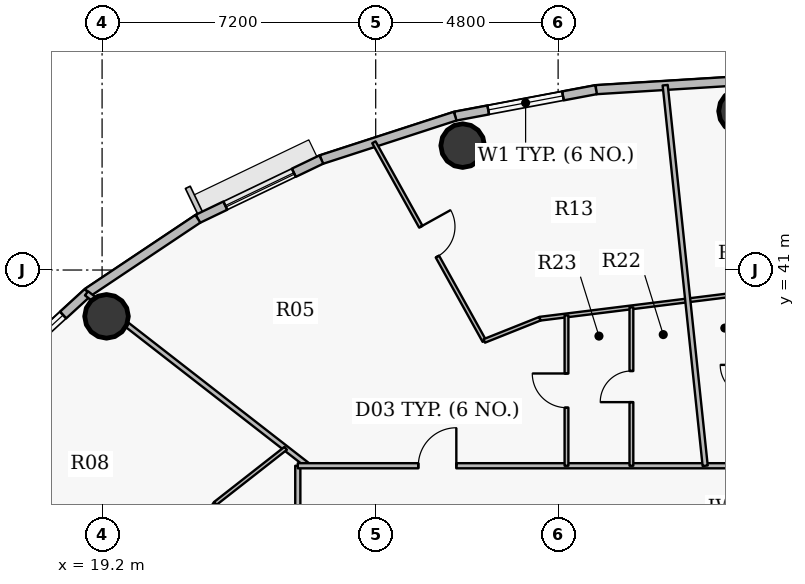
"""IFC4 building model, lengths in metres.
Left out: names, types, materials, properties, quantities, classifications, styles, units other than length and angle.
Written with IfcOpenShell. Run it as: python <this file> out.ifc"""

import sys

from ifc_helpers import new_model, si_unit, direction, frame, frame_2d, origin, origin_2d, place, context, subcontext, project, spatial, rectangle, hollow_circle, extrude, source, transform, mapped, element, fill, save


model = new_model("IFC4")
c1 = context("Model", 3, precision=1e-05, world=origin(), true_north=direction((0.0, 1.0)))
c2 = subcontext(c1, "Body", "Model", "MODEL_VIEW")
j1 = project(units=[si_unit("LENGTHUNIT", "METRE"), si_unit("PLANEANGLEUNIT", "RADIAN")], contexts=[c1])
p1 = place(None, origin())
s1 = spatial("IfcSite", under=j1, at=p1, CompositionType="ELEMENT")
p2 = place(p1, origin())
s2 = spatial("IfcBuilding", under=s1, at=p2, CompositionType="ELEMENT")
p3 = place(p2, frame((0.0, 0.0, 236.55)))
s3 = spatial("IfcBuildingStorey", under=s2, at=p3, CompositionType="ELEMENT", Elevation=236.55)
for number, where, z_axis, x_axis in (
    (1, (36.0, 45.18, 0.0), (0.0, 0.0, 1.0), (1.0, 0.0, 0.0)),
    (2, (28.688, 44.273, 0.0), (0.0, 0.0, 1.0), (1.0, 0.0, 0.0)),
    (3, (19.317, 39.781, 0.0), (0.0, 0.0, 1.0), (1.0, 0.0, 0.0)),
):
    element("IfcColumn", number, at=place(p3, frame(where, z_axis=z_axis, x_axis=x_axis)), inside=s3, PredefinedType="COLUMN", context=c2, shape_type="SweptSolid", body=[
        extrude(hollow_circle(Radius=0.575, WallThickness=0.036, at=origin_2d()), origin(), (0.0, 0.0, 1.0), 3.75),
    ])
p4 = place(p3, frame((32.198, 45.746, 0.0), z_axis=(0.0, 0.0, 1.0), x_axis=(0.998108785312, 0.06147237333, 0.0)))
e4 = element("IfcWall", 4, at=p4, inside=s3, PredefinedType="SOLIDWALL", context=c2, shape_type="SweptSolid", body=[
    extrude(rectangle(XDim=3.809, YDim=0.24, at=frame_2d((1.904, 0.0))), origin(), (0.0, 0.0, 1.0), 3.5),
])
p5 = place(p3, frame((28.491, 45.049, 0.0), z_axis=(0.0, 0.0, 1.0), x_axis=(0.982784898575, 0.184753465822, 0.0)))
e5 = element("IfcWall", 5, at=p5, inside=s3, PredefinedType="SOLIDWALL", context=c2, shape_type="SweptSolid", body=[
    extrude(rectangle(XDim=3.773, YDim=0.24, at=frame_2d((1.886, 0.0))), origin(), (0.0, 0.0, 1.0), 3.5),
])
p6 = place(p5, frame((0.886, 0.0, 0.9)))
e6 = element("IfcOpeningElement", 6, at=p6, cuts=e5, PredefinedType="OPENING", context=c2, shape_type="SweptSolid", body=[
    extrude(rectangle(XDim=2.0, YDim=1.75, at=origin_2d()), frame((1.0, 0.13, 0.875), z_axis=(0.0, -1.0, 0.0), x_axis=(1.0, 0.0, 0.0)), (0.0, 0.0, 1.0), 0.26),
])
p7 = place(p3, frame((24.969, 43.906, 0.0), z_axis=(0.0, 0.0, 1.0), x_axis=(0.951210789182, 0.308541787354, 0.0)))
e7 = element("IfcWall", 7, at=p7, inside=s3, PredefinedType="SOLIDWALL", context=c2, shape_type="SweptSolid", body=[
    extrude(rectangle(XDim=3.702, YDim=0.24, at=frame_2d((1.851, 0.0))), origin(), (0.0, 0.0, 1.0), 3.5),
])
p8 = place(p3, frame((21.72, 42.348, 0.0), z_axis=(0.0, 0.0, 1.0), x_axis=(0.901598104751, 0.432574684313, 0.0)))
e8 = element("IfcWall", 8, at=p8, inside=s3, PredefinedType="SOLIDWALL", context=c2, shape_type="SweptSolid", body=[
    extrude(rectangle(XDim=3.604, YDim=0.24, at=frame_2d((1.802, 0.0))), origin(), (0.0, 0.0, 1.0), 3.5),
])
p9 = place(p8, frame((0.802, 0.0, 0.9)))
e9 = element("IfcOpeningElement", 9, at=p9, cuts=e8, PredefinedType="OPENING", context=c2, shape_type="SweptSolid", body=[
    extrude(rectangle(XDim=2.0, YDim=1.75, at=origin_2d()), frame((1.0, 0.13, 0.875), z_axis=(0.0, -1.0, 0.0), x_axis=(1.0, 0.0, 0.0)), (0.0, 0.0, 1.0), 0.26),
])
p10 = place(p3, frame((18.824, 40.411, 0.0), z_axis=(0.0, 0.0, 1.0), x_axis=(0.831262496074, 0.555880079352, 0.0)))
e10 = element("IfcWall", 10, at=p10, inside=s3, PredefinedType="SOLIDWALL", context=c2, shape_type="SweptSolid", body=[
    extrude(rectangle(XDim=3.484, YDim=0.24, at=frame_2d((1.742, 0.0))), origin(), (0.0, 0.0, 1.0), 3.5),
])
p11 = place(p3, frame((16.352, 38.145, 0.0), z_axis=(0.0, 0.0, 1.0), x_axis=(0.737123922599, 0.675757591694, 0.0)))
e11 = element("IfcWall", 11, at=p11, inside=s3, PredefinedType="SOLIDWALL", context=c2, shape_type="SweptSolid", body=[
    extrude(rectangle(XDim=3.354, YDim=0.24, at=frame_2d((1.677, 0.0))), origin(), (0.0, 0.0, 1.0), 3.5),
])
p12 = place(p11, frame((0.873, 0.0, 0.9)))
e12 = element("IfcOpeningElement", 12, at=p12, cuts=e11, PredefinedType="OPENING", context=c2, shape_type="SweptSolid", body=[
    extrude(rectangle(XDim=1.6, YDim=1.75, at=origin_2d()), frame((0.8, 0.13, 0.875), z_axis=(0.0, -1.0, 0.0), x_axis=(1.0, 0.0, 0.0)), (0.0, 0.0, 1.0), 0.26),
])
p13 = place(p3, frame((18.791, 40.387, 0.0), z_axis=(0.0, 0.0, 1.0), x_axis=(0.789302404173, -0.614004653701, 0.0)))
e13 = element("IfcWall", 13, at=p13, inside=s3, PredefinedType="PARTITIONING", context=c2, shape_type="SweptSolid", body=[
    extrude(rectangle(XDim=7.39, YDim=0.135, at=frame_2d((3.695, 0.0))), origin(), (0.0, 0.0, 1.0), 2.935),
])
p14 = place(p3, frame((19.847, 31.273, 0.0), z_axis=(0.0, 0.0, 1.0), x_axis=(0.545399280946, 0.83817636828, 0.0)))
e14 = element("IfcWall", 14, at=p14, inside=s3, PredefinedType="PARTITIONING", context=c2, shape_type="SweptSolid", body=[
    extrude(rectangle(XDim=4.28, YDim=0.1, at=frame_2d((2.14, 0.0))), origin(), (0.0, 0.0, 1.0), 2.935),
])
p15 = place(p3, frame((22.182, 34.861, 0.0), z_axis=(0.0, 0.0, 1.0), x_axis=(0.78737344739, 0.616476320994, 0.0)))
e15 = element("IfcWall", 15, at=p15, inside=s3, PredefinedType="PARTITIONING", context=c2, shape_type="SweptSolid", body=[
    extrude(rectangle(XDim=2.35, YDim=0.1, at=frame_2d((1.175, 0.0))), origin(), (0.0, 0.0, 1.0), 2.935),
])
p16 = place(p3, frame((24.35, 27.95, 0.0), z_axis=(0.0, 0.0, 1.0), x_axis=(0.0, 1.0, 0.0)))
e16 = element("IfcWall", 16, at=p16, inside=s3, PredefinedType="PARTITIONING", context=c2, shape_type="SweptSolid", body=[
    extrude(rectangle(XDim=7.9, YDim=0.135, at=frame_2d((3.95, 0.0))), origin(), (0.0, 0.0, 1.0), 2.935),
])
p17 = place(p16, frame((3.45, 0.0, 0.0)))
e17 = element("IfcOpeningElement", 17, at=p17, cuts=e16, PredefinedType="OPENING", context=c2, shape_type="SweptSolid", body=[
    extrude(rectangle(XDim=1.0, YDim=2.15, at=origin_2d()), frame((0.5, 0.078, 1.075), z_axis=(0.0, -1.0, 0.0), x_axis=(1.0, 0.0, 0.0)), (0.0, 0.0, 1.0), 0.155),
])
p18 = place(p3, frame((24.35, 35.85, 0.0), z_axis=(0.0, 0.0, 1.0), x_axis=(1.0, 0.0, 0.0)))
e18 = element("IfcWall", 18, at=p18, inside=s3, PredefinedType="PARTITIONING", context=c2, shape_type="SweptSolid", body=[
    extrude(rectangle(XDim=26.218, YDim=0.135, at=frame_2d((13.109, 0.0))), origin(), (0.0, 0.0, 1.0), 2.935),
])
p19 = place(p18, frame((3.172, 0.0, 0.0)))
e19 = element("IfcOpeningElement", 19, at=p19, cuts=e18, PredefinedType="OPENING", context=c2, shape_type="SweptSolid", body=[
    extrude(rectangle(XDim=1.0, YDim=2.15, at=origin_2d()), frame((0.5, 0.078, 1.075), z_axis=(0.0, -1.0, 0.0), x_axis=(1.0, 0.0, 0.0)), (0.0, 0.0, 1.0), 0.155),
])
p20 = place(p18, frame((18.306, 0.0, 0.0)))
e20 = element("IfcOpeningElement", 20, at=p20, cuts=e18, PredefinedType="OPENING", context=c2, shape_type="SweptSolid", body=[
    extrude(rectangle(XDim=1.0, YDim=2.15, at=origin_2d()), frame((0.5, 0.078, 1.075), z_axis=(0.0, -1.0, 0.0), x_axis=(1.0, 0.0, 0.0)), (0.0, 0.0, 1.0), 0.155),
])
p21 = place(p3, frame((26.353, 44.361, 0.0), z_axis=(0.0, 0.0, 1.0), x_axis=(0.485760805935, -0.874091779745, 0.0)))
e21 = element("IfcWall", 21, at=p21, inside=s3, PredefinedType="PARTITIONING", context=c2, shape_type="SweptSolid", body=[
    extrude(rectangle(XDim=5.979, YDim=0.1, at=frame_2d((2.989, 0.0))), origin(), (0.0, 0.0, 1.0), 2.985),
])
p22 = place(p21, frame((2.539, 0.0, 0.0)))
e22 = element("IfcOpeningElement", 22, at=p22, cuts=e21, PredefinedType="OPENING", context=c2, shape_type="SweptSolid", body=[
    extrude(rectangle(XDim=0.9, YDim=2.1, at=origin_2d()), frame((0.45, 0.06, 1.05), z_axis=(0.0, -1.0, 0.0), x_axis=(1.0, 0.0, 0.0)), (0.0, 0.0, 1.0), 0.12),
])
p23 = place(p3, frame((29.257, 39.135, 0.0), z_axis=(0.0, 0.0, 1.0), x_axis=(0.928796620339, 0.370589851515, 0.0)))
e23 = element("IfcWall", 23, at=p23, inside=s3, PredefinedType="PARTITIONING", context=c2, shape_type="SweptSolid", body=[
    extrude(rectangle(XDim=1.577, YDim=0.1, at=frame_2d((0.789, 0.0))), origin(), (0.0, 0.0, 1.0), 2.935),
])
p24 = place(p3, frame((30.722, 39.719, 0.0), z_axis=(0.0, 0.0, 1.0), x_axis=(0.992397473883, 0.123074180196, 0.0)))
e24 = element("IfcWall", 24, at=p24, inside=s3, PredefinedType="PARTITIONING", context=c2, shape_type="SweptSolid", body=[
    extrude(rectangle(XDim=5.318, YDim=0.1, at=frame_2d((2.659, 0.0))), origin(), (0.0, 0.0, 1.0), 2.935),
])
p25 = place(p3, frame((31.42, 35.85, 0.0), z_axis=(0.0, 0.0, 1.0), x_axis=(0.0, 1.0, 0.0)))
e25 = element("IfcWall", 25, at=p25, inside=s3, PredefinedType="PARTITIONING", context=c2, shape_type="SweptSolid", body=[
    extrude(rectangle(XDim=3.956, YDim=0.1, at=frame_2d((1.978, 0.0))), origin(), (0.0, 0.0, 1.0), 2.935),
])
p26 = place(p25, frame((1.528, 0.0, 0.0)))
e26 = element("IfcOpeningElement", 26, at=p26, cuts=e25, PredefinedType="OPENING", context=c2, shape_type="SweptSolid", body=[
    extrude(rectangle(XDim=0.9, YDim=2.1, at=origin_2d()), frame((0.45, 0.06, 1.05), z_axis=(0.0, -1.0, 0.0), x_axis=(1.0, 0.0, 0.0)), (0.0, 0.0, 1.0), 0.12),
])
p27 = place(p3, frame((33.129, 35.85, 0.0), z_axis=(0.0, 0.0, 1.0), x_axis=(0.0, 1.0, 0.0)))
e27 = element("IfcWall", 27, at=p27, inside=s3, PredefinedType="PARTITIONING", context=c2, shape_type="SweptSolid", body=[
    extrude(rectangle(XDim=4.167, YDim=0.1, at=frame_2d((2.083, 0.0))), origin(), (0.0, 0.0, 1.0), 3.035),
])
p28 = place(p27, frame((1.674, 0.0, 0.0)))
e28 = element("IfcOpeningElement", 28, at=p28, cuts=e27, PredefinedType="OPENING", context=c2, shape_type="SweptSolid", body=[
    extrude(rectangle(XDim=0.82, YDim=2.1, at=origin_2d()), frame((0.41, 0.06, 1.05), z_axis=(0.0, -1.0, 0.0), x_axis=(1.0, 0.0, 0.0)), (0.0, 0.0, 1.0), 0.12),
])
p29 = place(p3, frame((34.017, 45.863, 0.0), z_axis=(0.0, 0.0, 1.0), x_axis=(0.104537097471, -0.994520987839, 0.0)))
e29 = element("IfcWall", 29, at=p29, inside=s3, PredefinedType="PARTITIONING", context=c2, shape_type="SweptSolid", body=[
    extrude(rectangle(XDim=10.068, YDim=0.135, at=frame_2d((5.034, 0.0))), origin(), (0.0, 0.0, 1.0), 2.985),
])
m1 = source(origin(), c2, "Body", "SweptSolid", [
    extrude(rectangle(XDim=2.0, YDim=1.75, at=origin_2d()), frame((1.0, 0.03, 0.875), z_axis=(0.0, -1.0, 0.0), x_axis=(1.0, 0.0, 0.0)), (0.0, 0.0, 1.0), 0.06),
])
p30 = place(p6, origin())
e30 = element("IfcWindow", 30, at=p30, inside=s3, PartitioningType="DOUBLE_PANEL_VERTICAL", PredefinedType="WINDOW", context=c2, shape_type="MappedRepresentation", body=[
    mapped(m1, transform((0.0, 0.0, 0.0), x_axis=(1.0, 0.0, 0.0), y_axis=(0.0, 1.0, 0.0), z_axis=(0.0, 0.0, 1.0), scale=1.0)),
])
fill(e6, e30)
p31 = place(p9, origin())
e31 = element("IfcWindow", 31, at=p31, inside=s3, PartitioningType="DOUBLE_PANEL_VERTICAL", PredefinedType="WINDOW", context=c2, shape_type="MappedRepresentation", body=[
    mapped(m1, transform((0.0, 0.0, 0.0), x_axis=(1.0, 0.0, 0.0), y_axis=(0.0, 1.0, 0.0), z_axis=(0.0, 0.0, 1.0), scale=1.0)),
])
fill(e9, e31)
m2 = source(origin(), c2, "Body", "SweptSolid", [
    extrude(rectangle(XDim=1.6, YDim=1.75, at=origin_2d()), frame((0.8, 0.03, 0.875), z_axis=(0.0, -1.0, 0.0), x_axis=(1.0, 0.0, 0.0)), (0.0, 0.0, 1.0), 0.06),
])
p32 = place(p12, origin())
e32 = element("IfcWindow", 32, at=p32, inside=s3, PartitioningType="DOUBLE_PANEL_VERTICAL", PredefinedType="WINDOW", context=c2, shape_type="MappedRepresentation", body=[
    mapped(m2, transform((0.0, 0.0, 0.0), x_axis=(1.0, 0.0, 0.0), y_axis=(0.0, 1.0, 0.0), z_axis=(0.0, 0.0, 1.0), scale=1.0)),
])
fill(e12, e32)
m3 = source(origin(), c2, "Body", "SweptSolid", [
    extrude(rectangle(XDim=1.0, YDim=2.15, at=origin_2d()), frame((0.5, 0.025, 1.075), z_axis=(0.0, -1.0, 0.0), x_axis=(1.0, 0.0, 0.0)), (0.0, 0.0, 1.0), 0.05),
])
p33 = place(p19, origin())
e33 = element("IfcDoor", 33, at=p33, inside=s3, OperationType="SINGLE_SWING_RIGHT", PredefinedType="DOOR", context=c2, shape_type="MappedRepresentation", body=[
    mapped(m3, transform((0.0, 0.0, 0.0), x_axis=(1.0, 0.0, 0.0), y_axis=(0.0, 1.0, 0.0), z_axis=(0.0, 0.0, 1.0), scale=1.0)),
])
fill(e19, e33)
m4 = source(origin(), c2, "Body", "SweptSolid", [
    extrude(rectangle(XDim=0.9, YDim=2.1, at=origin_2d()), frame((0.45, 0.025, 1.05), z_axis=(0.0, -1.0, 0.0), x_axis=(1.0, 0.0, 0.0)), (0.0, 0.0, 1.0), 0.05),
])
p34 = place(p22, origin())
e34 = element("IfcDoor", 34, at=p34, inside=s3, OperationType="SINGLE_SWING_LEFT", PredefinedType="DOOR", context=c2, shape_type="MappedRepresentation", body=[
    mapped(m4, transform((0.0, 0.0, 0.0), x_axis=(1.0, 0.0, 0.0), y_axis=(0.0, 1.0, 0.0), z_axis=(0.0, 0.0, 1.0), scale=1.0)),
])
fill(e22, e34)
p35 = place(p26, origin())
e35 = element("IfcDoor", 35, at=p35, inside=s3, OperationType="SINGLE_SWING_RIGHT", PredefinedType="DOOR", context=c2, shape_type="MappedRepresentation", body=[
    mapped(m4, transform((0.0, 0.0, 0.0), x_axis=(1.0, 0.0, 0.0), y_axis=(0.0, 1.0, 0.0), z_axis=(0.0, 0.0, 1.0), scale=1.0)),
])
fill(e26, e35)
m5 = source(origin(), c2, "Body", "SweptSolid", [
    extrude(rectangle(XDim=0.82, YDim=2.1, at=origin_2d()), frame((0.41, 0.025, 1.05), z_axis=(0.0, -1.0, 0.0), x_axis=(1.0, 0.0, 0.0)), (0.0, 0.0, 1.0), 0.05),
])
p36 = place(p28, origin())
e36 = element("IfcDoor", 36, at=p36, inside=s3, OperationType="SINGLE_SWING_LEFT", PredefinedType="DOOR", context=c2, shape_type="MappedRepresentation", body=[
    mapped(m5, transform((0.0, 0.0, 0.0), x_axis=(1.0, 0.0, 0.0), y_axis=(0.0, 1.0, 0.0), z_axis=(0.0, 0.0, 1.0), scale=1.0)),
])
fill(e28, e36)
save(model, sys.argv[1])
